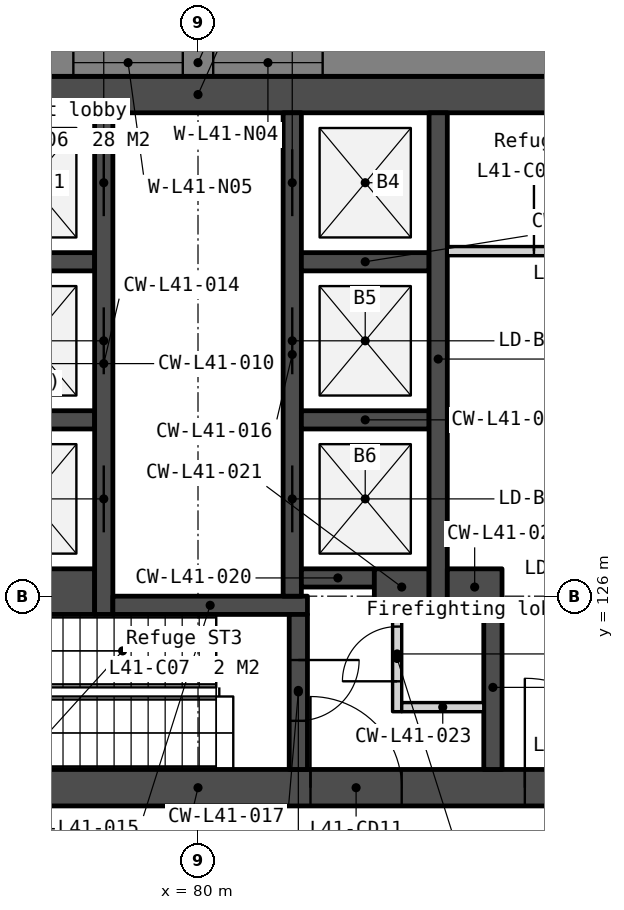
"""IFC4 building model, lengths in metres.
Left out: names, types, materials, properties, quantities, classifications, styles, units other than length and angle.
Written with IfcOpenShell. Run it as: python <this file> out.ifc"""

import sys

from ifc_helpers import new_model, si_unit, direction, frame, frame_2d, origin, place, context, subcontext, project, spatial, polyline, rectangle, outline, extrude, element, fill, save


model = new_model("IFC4")
c1 = context("Model", 3, precision=1e-05, world=origin(), true_north=direction((0.0, 1.0)))
c2 = subcontext(c1, "Body", "Model", "MODEL_VIEW")
j1 = project(units=[si_unit("LENGTHUNIT", "METRE"), si_unit("PLANEANGLEUNIT", "RADIAN")], contexts=[c1])
p1 = place(None, origin())
s1 = spatial("IfcSite", under=j1, at=p1, CompositionType="ELEMENT")
p2 = place(p1, origin())
s2 = spatial("IfcBuilding", under=s1, at=p2, CompositionType="ELEMENT")
p3 = place(p2, frame((0.0, 0.0, 163.7)))
s3 = spatial("IfcBuildingStorey", under=s2, at=p3, CompositionType="ELEMENT", Elevation=163.7)
p4 = place(p3, frame((69.0, 134.25, 0.0), z_axis=(0.0, 0.0, 1.0), x_axis=(1.0, 0.0, 0.0)))
e1 = element("IfcWall", 1, at=p4, inside=s3, PredefinedType="SOLIDWALL", context=c2, shape_type="SweptSolid", body=[
    extrude(rectangle(XDim=22.0, YDim=0.6, at=frame_2d((11.0, 0.0))), origin(), (0.0, 0.0, 1.0), 3.75),
])
p5 = place(p3, frame((69.0, 122.85, 0.0), z_axis=(0.0, 0.0, 1.0), x_axis=(1.0, 0.0, 0.0)))
e2 = element("IfcWall", 2, at=p5, inside=s3, PredefinedType="SOLIDWALL", context=c2, shape_type="SweptSolid", body=[
    extrude(rectangle(XDim=22.0, YDim=0.6, at=frame_2d((11.0, 0.0))), origin(), (0.0, 0.0, 1.0), 3.75),
])
p6 = place(p5, frame((16.375, 0.0, 0.0)))
e3 = element("IfcOpeningElement", 3, at=p6, cuts=e2, PredefinedType="OPENING", context=c2, shape_type="SweptSolid", body=[
    extrude(rectangle(XDim=1.8, YDim=2.1, at=frame_2d((0.9, 1.05))), frame((0.0, 0.31, 0.0), z_axis=(0.0, -1.0, 0.0), x_axis=(1.0, 0.0, 0.0)), (0.0, 0.0, 1.0), 0.62),
])
p7 = place(p5, frame((3.825, 0.0, 0.0)))
e4 = element("IfcOpeningElement", 4, at=p7, cuts=e2, PredefinedType="OPENING", context=c2, shape_type="SweptSolid", body=[
    extrude(rectangle(XDim=1.8, YDim=2.1, at=frame_2d((0.9, 1.05))), frame((0.0, 0.31, 0.0), z_axis=(0.0, -1.0, 0.0), x_axis=(1.0, 0.0, 0.0)), (0.0, 0.0, 1.0), 0.62),
])
p8 = place(p5, frame((12.85, 0.0, 0.0)))
e5 = element("IfcOpeningElement", 5, at=p8, cuts=e2, PredefinedType="OPENING", context=c2, shape_type="SweptSolid", body=[
    extrude(rectangle(XDim=1.5, YDim=2.1, at=frame_2d((0.75, 1.05))), frame((0.0, 0.31, 0.0), z_axis=(0.0, -1.0, 0.0), x_axis=(1.0, 0.0, 0.0)), (0.0, 0.0, 1.0), 0.62),
])
for number, where, z_axis, x_axis in (
    (6, (76.2, 131.5, 0.0), (0.0, 0.0, 1.0), (1.0, 0.0, 0.0)),
    (7, (76.2, 128.9, 0.0), (0.0, 0.0, 1.0), (1.0, 0.0, 0.0)),
):
    element("IfcWall", number, at=place(p3, frame(where, z_axis=z_axis, x_axis=x_axis)), inside=s3, PredefinedType="SOLIDWALL", context=c2, shape_type="SweptSolid", body=[
        extrude(rectangle(XDim=2.1, YDim=0.3, at=frame_2d((1.05, 0.0))), origin(), (0.0, 0.0, 1.0), 3.75),
    ])
p9 = place(p3, frame((76.2, 126.075, 0.0), z_axis=(0.0, 0.0, 1.0), x_axis=(1.0, 0.0, 0.0)))
e8 = element("IfcWall", 8, at=p9, inside=s3, PredefinedType="SOLIDWALL", context=c2, shape_type="SweptSolid", body=[
    extrude(rectangle(XDim=2.1, YDim=0.75, at=frame_2d((1.05, 0.0))), origin(), (0.0, 0.0, 1.0), 3.75),
])
p10 = place(p3, frame((78.45, 133.95, 0.0), z_axis=(0.0, 0.0, 1.0), x_axis=(0.0, -1.0, 0.0)))
e9 = element("IfcWall", 9, at=p10, inside=s3, PredefinedType="SOLIDWALL", context=c2, shape_type="SweptSolid", body=[
    extrude(rectangle(XDim=8.25, YDim=0.3, at=frame_2d((4.125, 0.0))), origin(), (0.0, 0.0, 1.0), 3.75),
])
p11 = place(p10, frame((0.6, 0.0, 0.0)))
e10 = element("IfcOpeningElement", 10, at=p11, cuts=e9, PredefinedType="OPENING", context=c2, shape_type="SweptSolid", body=[
    extrude(rectangle(XDim=1.1, YDim=2.1, at=frame_2d((0.55, 1.05))), frame((0.0, 0.16, 0.0), z_axis=(0.0, -1.0, 0.0), x_axis=(1.0, 0.0, 0.0)), (0.0, 0.0, 1.0), 0.32),
])
p12 = place(p10, frame((3.2, 0.0, 0.0)))
e11 = element("IfcOpeningElement", 11, at=p12, cuts=e9, PredefinedType="OPENING", context=c2, shape_type="SweptSolid", body=[
    extrude(rectangle(XDim=1.1, YDim=2.1, at=frame_2d((0.55, 1.05))), frame((0.0, 0.16, 0.0), z_axis=(0.0, -1.0, 0.0), x_axis=(1.0, 0.0, 0.0)), (0.0, 0.0, 1.0), 0.32),
])
p13 = place(p10, frame((5.8, 0.0, 0.0)))
e12 = element("IfcOpeningElement", 12, at=p13, cuts=e9, PredefinedType="OPENING", context=c2, shape_type="SweptSolid", body=[
    extrude(rectangle(XDim=1.1, YDim=2.1, at=frame_2d((0.55, 1.05))), frame((0.0, 0.16, 0.0), z_axis=(0.0, -1.0, 0.0), x_axis=(1.0, 0.0, 0.0)), (0.0, 0.0, 1.0), 0.32),
])
p14 = place(p3, frame((78.6, 125.85, 0.0), z_axis=(0.0, 0.0, 1.0), x_axis=(1.0, 0.0, 0.0)))
e13 = element("IfcWall", 13, at=p14, inside=s3, PredefinedType="SOLIDWALL", context=c2, shape_type="SweptSolid", body=[
    extrude(rectangle(XDim=3.2, YDim=0.3, at=frame_2d((1.6, 0.0))), origin(), (0.0, 0.0, 1.0), 3.75),
])
p15 = place(p3, frame((81.55, 133.95, 0.0), z_axis=(0.0, 0.0, 1.0), x_axis=(0.0, -1.0, 0.0)))
e14 = element("IfcWall", 14, at=p15, inside=s3, PredefinedType="SOLIDWALL", context=c2, shape_type="SweptSolid", body=[
    extrude(rectangle(XDim=7.95, YDim=0.3, at=frame_2d((3.975, 0.0))), origin(), (0.0, 0.0, 1.0), 3.75),
])
p16 = place(p15, frame((0.6, 0.0, 0.0)))
e15 = element("IfcOpeningElement", 15, at=p16, cuts=e14, PredefinedType="OPENING", context=c2, shape_type="SweptSolid", body=[
    extrude(rectangle(XDim=1.1, YDim=2.1, at=frame_2d((0.55, 1.05))), frame((0.0, 0.16, 0.0), z_axis=(0.0, -1.0, 0.0), x_axis=(1.0, 0.0, 0.0)), (0.0, 0.0, 1.0), 0.32),
])
p17 = place(p15, frame((3.2, 0.0, 0.0)))
e16 = element("IfcOpeningElement", 16, at=p17, cuts=e14, PredefinedType="OPENING", context=c2, shape_type="SweptSolid", body=[
    extrude(rectangle(XDim=1.1, YDim=2.1, at=frame_2d((0.55, 1.05))), frame((0.0, 0.16, 0.0), z_axis=(0.0, -1.0, 0.0), x_axis=(1.0, 0.0, 0.0)), (0.0, 0.0, 1.0), 0.32),
])
p18 = place(p15, frame((5.8, 0.0, 0.0)))
e17 = element("IfcOpeningElement", 17, at=p18, cuts=e14, PredefinedType="OPENING", context=c2, shape_type="SweptSolid", body=[
    extrude(rectangle(XDim=1.1, YDim=2.1, at=frame_2d((0.55, 1.05))), frame((0.0, 0.16, 0.0), z_axis=(0.0, -1.0, 0.0), x_axis=(1.0, 0.0, 0.0)), (0.0, 0.0, 1.0), 0.32),
])
p19 = place(p3, frame((81.65, 125.7, 0.0), z_axis=(0.0, 0.0, 1.0), x_axis=(0.0, -1.0, 0.0)))
e18 = element("IfcWall", 18, at=p19, inside=s3, PredefinedType="SOLIDWALL", context=c2, shape_type="SweptSolid", body=[
    extrude(rectangle(XDim=2.55, YDim=0.3, at=frame_2d((1.275, 0.0))), origin(), (0.0, 0.0, 1.0), 3.75),
])
p20 = place(p19, frame((0.75, 0.0, 0.0)))
e19 = element("IfcOpeningElement", 19, at=p20, cuts=e18, PredefinedType="OPENING", context=c2, shape_type="SweptSolid", body=[
    extrude(rectangle(XDim=1.0, YDim=2.1, at=frame_2d((0.5, 1.05))), frame((0.0, 0.16, 0.0), z_axis=(0.0, -1.0, 0.0), x_axis=(1.0, 0.0, 0.0)), (0.0, 0.0, 1.0), 0.32),
])
for number, where, z_axis, x_axis in (
    (20, (81.7, 131.5, 0.0), (0.0, 0.0, 1.0), (1.0, 0.0, 0.0)),
    (21, (81.7, 128.9, 0.0), (0.0, 0.0, 1.0), (1.0, 0.0, 0.0)),
):
    element("IfcWall", number, at=place(p3, frame(where, z_axis=z_axis, x_axis=x_axis)), inside=s3, PredefinedType="SOLIDWALL", context=c2, shape_type="SweptSolid", body=[
        extrude(rectangle(XDim=2.1, YDim=0.3, at=frame_2d((1.05, 0.0))), origin(), (0.0, 0.0, 1.0), 3.75),
    ])
p21 = place(p3, frame((81.7, 126.3, 0.0), z_axis=(0.0, 0.0, 1.0), x_axis=(1.0, 0.0, 0.0)))
e22 = element("IfcWall", 22, at=p21, inside=s3, PredefinedType="SOLIDWALL", context=c2, shape_type="SweptSolid", body=[
    extrude(rectangle(XDim=1.2, YDim=0.3, at=frame_2d((0.6, 0.0))), origin(), (0.0, 0.0, 1.0), 3.75),
])
p22 = place(p3, frame((82.9, 126.15, 0.0), z_axis=(0.0, 0.0, 1.0), x_axis=(1.0, 0.0, 0.0)))
e23 = element("IfcWall", 23, at=p22, inside=s3, PredefinedType="SOLIDWALL", context=c2, shape_type="SweptSolid", body=[
    extrude(rectangle(XDim=0.9, YDim=0.6, at=frame_2d((0.45, 0.0))), origin(), (0.0, 0.0, 1.0), 3.75),
])
p23 = place(p3, frame((83.275, 125.85, 0.0), z_axis=(0.0, 0.0, 1.0), x_axis=(0.0, -1.0, 0.0)))
e24 = element("IfcWall", 24, at=p23, inside=s3, PredefinedType="PARTITIONING", context=c2, shape_type="SweptSolid", body=[
    extrude(rectangle(XDim=1.75, YDim=0.15, at=frame_2d((0.875, 0.0))), origin(), (0.0, 0.0, 1.0), 3.75),
])
p24 = place(p23, frame((0.35, 0.0, 0.0)))
e25 = element("IfcOpeningElement", 25, at=p24, cuts=e24, PredefinedType="OPENING", context=c2, shape_type="SweptSolid", body=[
    extrude(rectangle(XDim=0.9, YDim=2.1, at=frame_2d((0.45, 1.05))), frame((0.0, 0.085, 0.0), z_axis=(0.0, -1.0, 0.0), x_axis=(1.0, 0.0, 0.0)), (0.0, 0.0, 1.0), 0.17),
])
p25 = place(p3, frame((83.35, 124.175, 0.0), z_axis=(0.0, 0.0, 1.0), x_axis=(1.0, 0.0, 0.0)))
e26 = element("IfcWall", 26, at=p25, inside=s3, PredefinedType="PARTITIONING", context=c2, shape_type="SweptSolid", body=[
    extrude(rectangle(XDim=1.35, YDim=0.15, at=frame_2d((0.675, 0.0))), origin(), (0.0, 0.0, 1.0), 3.75),
])
p26 = place(p3, frame((83.95, 133.95, 0.0), z_axis=(0.0, 0.0, 1.0), x_axis=(0.0, -1.0, 0.0)))
e27 = element("IfcWall", 27, at=p26, inside=s3, PredefinedType="SOLIDWALL", context=c2, shape_type="SweptSolid", body=[
    extrude(rectangle(XDim=8.1, YDim=0.3, at=frame_2d((4.05, 0.0))), origin(), (0.0, 0.0, 1.0), 3.75),
])
p27 = place(p3, frame((84.1, 131.675, 0.0), z_axis=(0.0, 0.0, 1.0), x_axis=(1.0, 0.0, 0.0)))
e28 = element("IfcWall", 28, at=p27, inside=s3, PredefinedType="PARTITIONING", context=c2, shape_type="SweptSolid", body=[
    extrude(rectangle(XDim=3.45, YDim=0.15, at=frame_2d((1.725, 0.0))), origin(), (0.0, 0.0, 1.0), 3.75),
])
p28 = place(p27, frame((1.425, 0.0, 0.0)))
e29 = element("IfcOpeningElement", 29, at=p28, cuts=e28, PredefinedType="OPENING", context=c2, shape_type="SweptSolid", body=[
    extrude(rectangle(XDim=1.5, YDim=2.1, at=frame_2d((0.75, 1.05))), frame((0.0, 0.085, 0.0), z_axis=(0.0, -1.0, 0.0), x_axis=(1.0, 0.0, 0.0)), (0.0, 0.0, 1.0), 0.17),
])
p29 = place(p3, frame((84.1, 126.15, 0.0), z_axis=(0.0, 0.0, 1.0), x_axis=(1.0, 0.0, 0.0)))
e30 = element("IfcWall", 30, at=p29, inside=s3, PredefinedType="SOLIDWALL", context=c2, shape_type="SweptSolid", body=[
    extrude(rectangle(XDim=0.9, YDim=0.6, at=frame_2d((0.45, 0.0))), origin(), (0.0, 0.0, 1.0), 3.75),
])
p30 = place(p3, frame((84.85, 125.85, 0.0), z_axis=(0.0, 0.0, 1.0), x_axis=(0.0, -1.0, 0.0)))
e31 = element("IfcWall", 31, at=p30, inside=s3, PredefinedType="SOLIDWALL", context=c2, shape_type="SweptSolid", body=[
    extrude(rectangle(XDim=2.7, YDim=0.3, at=frame_2d((1.35, 0.0))), origin(), (0.0, 0.0, 1.0), 3.75),
])
p31 = place(p3, frame((100.243, 134.775, -0.15), z_axis=(0.0, 0.0, 1.0), x_axis=(-1.0, 0.0, 0.0)))
e32 = element("IfcWall", 32, at=p31, inside=s3, PredefinedType="SOLIDWALL", context=c2, shape_type="SweptSolid", body=[
    extrude(outline(polyline([(40.486, 0.0), (40.486, 3.9), (0.0, 3.9), (0.0, 0.0), (40.486, 0.0)])), frame((0.0, 0.225, 0.0), z_axis=(0.0, -1.0, 0.0), x_axis=(1.0, 0.0, 0.0)), (0.0, 0.0, 1.0), 0.45),
])
p32 = place(p31, frame((0.837, 0.0, 0.95)))
e33 = element("IfcOpeningElement", 33, at=p32, cuts=e32, PredefinedType="OPENING", context=c2, shape_type="SweptSolid", body=[
    extrude(rectangle(XDim=1.2, YDim=2.2, at=frame_2d((0.6, 1.1))), frame((0.0, 0.235, 0.0), z_axis=(0.0, -1.0, 0.0), x_axis=(1.0, 0.0, 0.0)), (0.0, 0.0, 1.0), 0.47),
])
p33 = place(p31, frame((8.072, 0.0, 0.95)))
e34 = element("IfcOpeningElement", 34, at=p33, cuts=e32, PredefinedType="OPENING", context=c2, shape_type="SweptSolid", body=[
    extrude(rectangle(XDim=1.8, YDim=2.2, at=frame_2d((0.9, 1.1))), frame((0.0, 0.235, 0.0), z_axis=(0.0, -1.0, 0.0), x_axis=(1.0, 0.0, 0.0)), (0.0, 0.0, 1.0), 0.47),
])
p34 = place(p31, frame((10.372, 0.0, 0.95)))
e35 = element("IfcOpeningElement", 35, at=p34, cuts=e32, PredefinedType="OPENING", context=c2, shape_type="SweptSolid", body=[
    extrude(rectangle(XDim=1.8, YDim=2.2, at=frame_2d((0.9, 1.1))), frame((0.0, 0.235, 0.0), z_axis=(0.0, -1.0, 0.0), x_axis=(1.0, 0.0, 0.0)), (0.0, 0.0, 1.0), 0.47),
])
p35 = place(p31, frame((18.193, 0.0, 0.95)))
e36 = element("IfcOpeningElement", 36, at=p35, cuts=e32, PredefinedType="OPENING", context=c2, shape_type="SweptSolid", body=[
    extrude(rectangle(XDim=1.8, YDim=2.2, at=frame_2d((0.9, 1.1))), frame((0.0, 0.235, 0.0), z_axis=(0.0, -1.0, 0.0), x_axis=(1.0, 0.0, 0.0)), (0.0, 0.0, 1.0), 0.47),
])
p36 = place(p31, frame((20.493, 0.0, 0.95)))
e37 = element("IfcOpeningElement", 37, at=p36, cuts=e32, PredefinedType="OPENING", context=c2, shape_type="SweptSolid", body=[
    extrude(rectangle(XDim=1.8, YDim=2.2, at=frame_2d((0.9, 1.1))), frame((0.0, 0.235, 0.0), z_axis=(0.0, -1.0, 0.0), x_axis=(1.0, 0.0, 0.0)), (0.0, 0.0, 1.0), 0.47),
])
p37 = place(p31, frame((28.315, 0.0, 0.95)))
e38 = element("IfcOpeningElement", 38, at=p37, cuts=e32, PredefinedType="OPENING", context=c2, shape_type="SweptSolid", body=[
    extrude(rectangle(XDim=1.8, YDim=2.2, at=frame_2d((0.9, 1.1))), frame((0.0, 0.235, 0.0), z_axis=(0.0, -1.0, 0.0), x_axis=(1.0, 0.0, 0.0)), (0.0, 0.0, 1.0), 0.47),
])
p38 = place(p31, frame((30.615, 0.0, 0.95)))
e39 = element("IfcOpeningElement", 39, at=p38, cuts=e32, PredefinedType="OPENING", context=c2, shape_type="SweptSolid", body=[
    extrude(rectangle(XDim=1.8, YDim=2.2, at=frame_2d((0.9, 1.1))), frame((0.0, 0.235, 0.0), z_axis=(0.0, -1.0, 0.0), x_axis=(1.0, 0.0, 0.0)), (0.0, 0.0, 1.0), 0.47),
])
p39 = place(p31, frame((38.449, 0.0, 0.95)))
e40 = element("IfcOpeningElement", 40, at=p39, cuts=e32, PredefinedType="OPENING", context=c2, shape_type="SweptSolid", body=[
    extrude(rectangle(XDim=1.2, YDim=2.2, at=frame_2d((0.6, 1.1))), frame((0.0, 0.235, 0.0), z_axis=(0.0, -1.0, 0.0), x_axis=(1.0, 0.0, 0.0)), (0.0, 0.0, 1.0), 0.47),
])
p40 = place(p3, frame((57.652, 131.129, -0.15), z_axis=(0.0, 0.0, 1.0), x_axis=(0.499997369791, -0.866026922331, 0.0)))
e41 = element("IfcWall", 41, at=p40, inside=s3, PredefinedType="SOLIDWALL", context=c2, shape_type="SweptSolid", body=[
    extrude(outline(polyline([(40.486, 0.0), (40.486, 3.9), (0.0, 3.9), (0.0, 0.0), (40.486, 0.0)])), frame((0.0, 0.225, 0.0), z_axis=(0.0, -1.0, 0.0), x_axis=(1.0, 0.0, 0.0)), (0.0, 0.0, 1.0), 0.45),
])
p41 = place(p40, frame((0.837, 0.0, 0.95)))
e42 = element("IfcOpeningElement", 42, at=p41, cuts=e41, PredefinedType="OPENING", context=c2, shape_type="SweptSolid", body=[
    extrude(rectangle(XDim=1.2, YDim=2.2, at=frame_2d((0.6, 1.1))), frame((0.0, 0.235, 0.0), z_axis=(0.0, -1.0, 0.0), x_axis=(1.0, 0.0, 0.0)), (0.0, 0.0, 1.0), 0.47),
])
p42 = place(p40, frame((8.072, 0.0, 0.95)))
e43 = element("IfcOpeningElement", 43, at=p42, cuts=e41, PredefinedType="OPENING", context=c2, shape_type="SweptSolid", body=[
    extrude(rectangle(XDim=1.8, YDim=2.2, at=frame_2d((0.9, 1.1))), frame((0.0, 0.235, 0.0), z_axis=(0.0, -1.0, 0.0), x_axis=(1.0, 0.0, 0.0)), (0.0, 0.0, 1.0), 0.47),
])
p43 = place(p40, frame((10.372, 0.0, 0.95)))
e44 = element("IfcOpeningElement", 44, at=p43, cuts=e41, PredefinedType="OPENING", context=c2, shape_type="SweptSolid", body=[
    extrude(rectangle(XDim=1.8, YDim=2.2, at=frame_2d((0.9, 1.1))), frame((0.0, 0.235, 0.0), z_axis=(0.0, -1.0, 0.0), x_axis=(1.0, 0.0, 0.0)), (0.0, 0.0, 1.0), 0.47),
])
p44 = place(p40, frame((18.193, 0.0, 0.95)))
e45 = element("IfcOpeningElement", 45, at=p44, cuts=e41, PredefinedType="OPENING", context=c2, shape_type="SweptSolid", body=[
    extrude(rectangle(XDim=1.8, YDim=2.2, at=frame_2d((0.9, 1.1))), frame((0.0, 0.235, 0.0), z_axis=(0.0, -1.0, 0.0), x_axis=(1.0, 0.0, 0.0)), (0.0, 0.0, 1.0), 0.47),
])
p45 = place(p40, frame((20.493, 0.0, 0.95)))
e46 = element("IfcOpeningElement", 46, at=p45, cuts=e41, PredefinedType="OPENING", context=c2, shape_type="SweptSolid", body=[
    extrude(rectangle(XDim=1.8, YDim=2.2, at=frame_2d((0.9, 1.1))), frame((0.0, 0.235, 0.0), z_axis=(0.0, -1.0, 0.0), x_axis=(1.0, 0.0, 0.0)), (0.0, 0.0, 1.0), 0.47),
])
p46 = place(p40, frame((28.315, 0.0, 0.95)))
e47 = element("IfcOpeningElement", 47, at=p46, cuts=e41, PredefinedType="OPENING", context=c2, shape_type="SweptSolid", body=[
    extrude(rectangle(XDim=1.8, YDim=2.2, at=frame_2d((0.9, 1.1))), frame((0.0, 0.235, 0.0), z_axis=(0.0, -1.0, 0.0), x_axis=(1.0, 0.0, 0.0)), (0.0, 0.0, 1.0), 0.47),
])
p47 = place(p40, frame((30.615, 0.0, 0.95)))
e48 = element("IfcOpeningElement", 48, at=p47, cuts=e41, PredefinedType="OPENING", context=c2, shape_type="SweptSolid", body=[
    extrude(rectangle(XDim=1.8, YDim=2.2, at=frame_2d((0.9, 1.1))), frame((0.0, 0.235, 0.0), z_axis=(0.0, -1.0, 0.0), x_axis=(1.0, 0.0, 0.0)), (0.0, 0.0, 1.0), 0.47),
])
p48 = place(p40, frame((38.449, 0.0, 0.95)))
e49 = element("IfcOpeningElement", 49, at=p48, cuts=e41, PredefinedType="OPENING", context=c2, shape_type="SweptSolid", body=[
    extrude(rectangle(XDim=1.2, YDim=2.2, at=frame_2d((0.6, 1.1))), frame((0.0, 0.235, 0.0), z_axis=(0.0, -1.0, 0.0), x_axis=(1.0, 0.0, 0.0)), (0.0, 0.0, 1.0), 0.47),
])
p49 = place(p11, origin())
e50 = element("IfcDoor", 50, at=p49, inside=s3, OperationType="SLIDING_TO_RIGHT", PredefinedType="DOOR", context=c2, shape_type="SweptSolid", body=[
    extrude(rectangle(XDim=1.1, YDim=2.1, at=frame_2d((0.55, 1.05))), frame((0.0, 0.025, 0.0), z_axis=(0.0, -1.0, 0.0), x_axis=(1.0, 0.0, 0.0)), (0.0, 0.0, 1.0), 0.05),
])
fill(e10, e50)
p50 = place(p12, origin())
e51 = element("IfcDoor", 51, at=p50, inside=s3, OperationType="SLIDING_TO_RIGHT", PredefinedType="DOOR", context=c2, shape_type="SweptSolid", body=[
    extrude(rectangle(XDim=1.1, YDim=2.1, at=frame_2d((0.55, 1.05))), frame((0.0, 0.025, 0.0), z_axis=(0.0, -1.0, 0.0), x_axis=(1.0, 0.0, 0.0)), (0.0, 0.0, 1.0), 0.05),
])
fill(e11, e51)
p51 = place(p13, origin())
e52 = element("IfcDoor", 52, at=p51, inside=s3, OperationType="SLIDING_TO_RIGHT", PredefinedType="DOOR", context=c2, shape_type="SweptSolid", body=[
    extrude(rectangle(XDim=1.1, YDim=2.1, at=frame_2d((0.55, 1.05))), frame((0.0, 0.025, 0.0), z_axis=(0.0, -1.0, 0.0), x_axis=(1.0, 0.0, 0.0)), (0.0, 0.0, 1.0), 0.05),
])
fill(e12, e52)
p52 = place(p16, origin())
e53 = element("IfcDoor", 53, at=p52, inside=s3, OperationType="SLIDING_TO_LEFT", PredefinedType="DOOR", context=c2, shape_type="SweptSolid", body=[
    extrude(rectangle(XDim=1.1, YDim=2.1, at=frame_2d((0.55, 1.05))), frame((0.0, 0.025, 0.0), z_axis=(0.0, -1.0, 0.0), x_axis=(1.0, 0.0, 0.0)), (0.0, 0.0, 1.0), 0.05),
])
fill(e15, e53)
p53 = place(p17, origin())
e54 = element("IfcDoor", 54, at=p53, inside=s3, OperationType="SLIDING_TO_LEFT", PredefinedType="DOOR", context=c2, shape_type="SweptSolid", body=[
    extrude(rectangle(XDim=1.1, YDim=2.1, at=frame_2d((0.55, 1.05))), frame((0.0, 0.025, 0.0), z_axis=(0.0, -1.0, 0.0), x_axis=(1.0, 0.0, 0.0)), (0.0, 0.0, 1.0), 0.05),
])
fill(e16, e54)
p54 = place(p18, origin())
e55 = element("IfcDoor", 55, at=p54, inside=s3, OperationType="SLIDING_TO_LEFT", PredefinedType="DOOR", context=c2, shape_type="SweptSolid", body=[
    extrude(rectangle(XDim=1.1, YDim=2.1, at=frame_2d((0.55, 1.05))), frame((0.0, 0.025, 0.0), z_axis=(0.0, -1.0, 0.0), x_axis=(1.0, 0.0, 0.0)), (0.0, 0.0, 1.0), 0.05),
])
fill(e17, e55)
p55 = place(p6, origin())
e56 = element("IfcDoor", 56, at=p55, inside=s3, OperationType="DOUBLE_DOOR_DOUBLE_SWING", PredefinedType="DOOR", context=c2, shape_type="SweptSolid", body=[
    extrude(rectangle(XDim=1.8, YDim=2.1, at=frame_2d((0.9, 1.05))), frame((0.0, 0.025, 0.0), z_axis=(0.0, -1.0, 0.0), x_axis=(1.0, 0.0, 0.0)), (0.0, 0.0, 1.0), 0.05),
])
fill(e3, e56)
p56 = place(p8, origin())
e57 = element("IfcDoor", 57, at=p56, inside=s3, OperationType="DOUBLE_DOOR_DOUBLE_SWING", PredefinedType="DOOR", context=c2, shape_type="SweptSolid", body=[
    extrude(rectangle(XDim=1.5, YDim=2.1, at=frame_2d((0.75, 1.05))), frame((0.0, 0.025, 0.0), z_axis=(0.0, -1.0, 0.0), x_axis=(1.0, 0.0, 0.0)), (0.0, 0.0, 1.0), 0.05),
])
fill(e5, e57)
p57 = place(p24, origin())
e58 = element("IfcDoor", 58, at=p57, inside=s3, OperationType="SINGLE_SWING_RIGHT", PredefinedType="DOOR", context=c2, shape_type="SweptSolid", body=[
    extrude(rectangle(XDim=0.9, YDim=2.1, at=frame_2d((0.45, 1.05))), frame((0.0, 0.025, 0.0), z_axis=(0.0, -1.0, 0.0), x_axis=(1.0, 0.0, 0.0)), (0.0, 0.0, 1.0), 0.05),
])
fill(e25, e58)
p58 = place(p28, origin())
e59 = element("IfcDoor", 59, at=p58, inside=s3, OperationType="DOUBLE_DOOR_DOUBLE_SWING", PredefinedType="DOOR", context=c2, shape_type="SweptSolid", body=[
    extrude(rectangle(XDim=1.5, YDim=2.1, at=frame_2d((0.75, 1.05))), frame((0.0, 0.025, 0.0), z_axis=(0.0, -1.0, 0.0), x_axis=(1.0, 0.0, 0.0)), (0.0, 0.0, 1.0), 0.05),
])
fill(e29, e59)
p59 = place(p20, origin())
e60 = element("IfcDoor", 60, at=p59, inside=s3, OperationType="SINGLE_SWING_LEFT", PredefinedType="DOOR", context=c2, shape_type="SweptSolid", body=[
    extrude(rectangle(XDim=1.0, YDim=2.1, at=frame_2d((0.5, 1.05))), frame((0.0, 0.025, 0.0), z_axis=(0.0, -1.0, 0.0), x_axis=(1.0, 0.0, 0.0)), (0.0, 0.0, 1.0), 0.05),
])
fill(e19, e60)
p60 = place(p35, origin())
e61 = element("IfcWindow", 61, at=p60, inside=s3, PartitioningType="SINGLE_PANEL", PredefinedType="WINDOW", context=c2, shape_type="SweptSolid", body=[
    extrude(rectangle(XDim=1.8, YDim=2.2, at=frame_2d((0.9, 1.1))), frame((0.0, 0.03, 0.0), z_axis=(0.0, -1.0, 0.0), x_axis=(1.0, 0.0, 0.0)), (0.0, 0.0, 1.0), 0.06),
])
fill(e36, e61)
p61 = place(p36, origin())
e62 = element("IfcWindow", 62, at=p61, inside=s3, PartitioningType="SINGLE_PANEL", PredefinedType="WINDOW", context=c2, shape_type="SweptSolid", body=[
    extrude(rectangle(XDim=1.8, YDim=2.2, at=frame_2d((0.9, 1.1))), frame((0.0, 0.03, 0.0), z_axis=(0.0, -1.0, 0.0), x_axis=(1.0, 0.0, 0.0)), (0.0, 0.0, 1.0), 0.06),
])
fill(e37, e62)
save(model, sys.argv[1])
